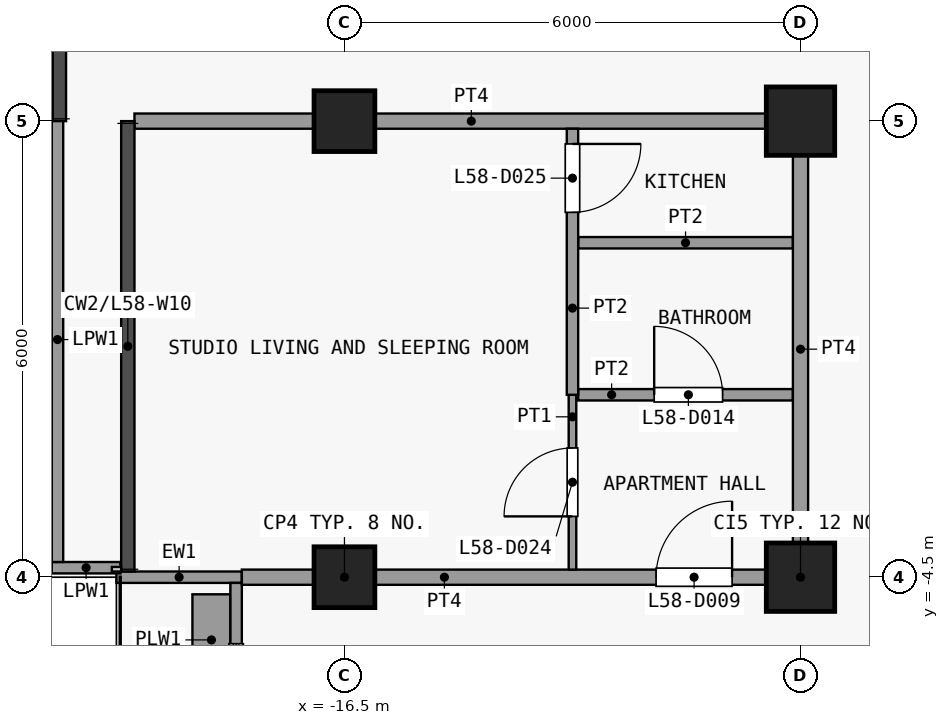
"""IFC4 building model, lengths in metres.
Left out: names, types, materials, properties, quantities, classifications, styles, units other than length and angle.
Written with IfcOpenShell. Run it as: python <this file> out.ifc"""

import sys

from ifc_helpers import new_model, si_unit, direction, frame, frame_2d, origin, origin_2d, place, context, subcontext, project, spatial, rectangle, extrude, element, fill, save


model = new_model("IFC4")
c1 = context("Model", 3, precision=1e-05, world=origin(), true_north=direction((0.0, 1.0)))
c2 = subcontext(c1, "Body", "Model", "MODEL_VIEW")
j1 = project(units=[si_unit("LENGTHUNIT", "METRE"), si_unit("PLANEANGLEUNIT", "RADIAN")], contexts=[c1])
p1 = place(None, origin())
s1 = spatial("IfcSite", under=j1, at=p1, CompositionType="ELEMENT")
p2 = place(p1, origin())
s2 = spatial("IfcBuilding", under=s1, at=p2, CompositionType="ELEMENT")
p3 = place(p2, frame((0.0, 0.0, 230.3)))
s3 = spatial("IfcBuildingStorey", under=s2, at=p3, CompositionType="ELEMENT", Elevation=230.3)
for number, where, z_axis, x_axis in (
    (1, (-16.5, -4.5, 0.0), (0.0, 0.0, 1.0), (1.0, 0.0, 0.0)),
    (2, (-16.5, 1.5, 0.0), (0.0, 0.0, 1.0), (1.0, 0.0, 0.0)),
):
    element("IfcColumn", number, at=place(p3, frame(where, z_axis=z_axis, x_axis=x_axis)), inside=s3, PredefinedType="COLUMN", context=c2, shape_type="SweptSolid", body=[
        extrude(rectangle(XDim=0.8, YDim=0.8, at=origin_2d()), origin(), (0.0, 0.0, 1.0), 3.6),
    ])
for number, where, z_axis, x_axis in (
    (3, (-10.5, -4.5, 0.0), (0.0, 0.0, 1.0), (1.0, 0.0, 0.0)),
    (4, (-10.5, 1.5, 0.0), (0.0, 0.0, 1.0), (1.0, 0.0, 0.0)),
):
    element("IfcColumn", number, at=place(p3, frame(where, z_axis=z_axis, x_axis=x_axis)), inside=s3, PredefinedType="COLUMN", context=c2, shape_type="SweptSolid", body=[
        extrude(rectangle(XDim=0.9, YDim=0.9, at=origin_2d()), origin(), (0.0, 0.0, 1.0), 3.6),
    ])
p4 = place(p3, frame((-17.85, -4.5, 0.0), z_axis=(0.0, 0.0, 1.0), x_axis=(-1.0, 0.0, 0.0)))
e5 = element("IfcWall", 5, at=p4, inside=s3, PredefinedType="SOLIDWALL", context=c2, shape_type="SweptSolid", body=[
    extrude(rectangle(XDim=1.65, YDim=0.15, at=frame_2d((0.825, 0.0))), origin(), (0.0, 0.0, 1.0), 3.3),
])
p5 = place(p3, frame((-17.925, -13.425, 0.0), z_axis=(0.0, 0.0, 1.0), x_axis=(0.0, 1.0, 0.0)))
e6 = element("IfcWall", 6, at=p5, inside=s3, PredefinedType="SOLIDWALL", context=c2, shape_type="SweptSolid", body=[
    extrude(rectangle(XDim=8.85, YDim=0.15, at=frame_2d((4.425, 0.0))), origin(), (0.0, 0.0, 1.0), 3.3),
])
p6 = place(p5, frame((3.05, 0.0, 0.0)))
e7 = element("IfcOpeningElement", 7, at=p6, cuts=e6, PredefinedType="OPENING", context=c2, shape_type="SweptSolid", body=[
    extrude(rectangle(XDim=1.2, YDim=2.4, at=frame_2d((0.6, 1.2))), frame((0.0, 0.085, 0.0), z_axis=(0.0, -1.0, 0.0), x_axis=(1.0, 0.0, 0.0)), (0.0, 0.0, 1.0), 0.17),
])
p7 = place(p5, frame((0.25, 0.0, 0.9)))
e8 = element("IfcOpeningElement", 8, at=p7, cuts=e6, PredefinedType="OPENING", context=c2, shape_type="SweptSolid", body=[
    extrude(rectangle(XDim=2.05, YDim=2.1, at=frame_2d((1.025, 1.05))), frame((0.0, 0.085, 0.0), z_axis=(0.0, -1.0, 0.0), x_axis=(1.0, 0.0, 0.0)), (0.0, 0.0, 1.0), 0.17),
])
p8 = place(p5, frame((5.775, 0.0, 0.9)))
e9 = element("IfcOpeningElement", 9, at=p8, cuts=e6, PredefinedType="OPENING", context=c2, shape_type="SweptSolid", body=[
    extrude(rectangle(XDim=2.275, YDim=2.1, at=frame_2d((1.137, 1.05))), frame((0.0, 0.085, 0.0), z_axis=(0.0, -1.0, 0.0), x_axis=(1.0, 0.0, 0.0)), (0.0, 0.0, 1.0), 0.17),
])
p9 = place(p3, frame((-18.25, -5.925, 0.0), z_axis=(0.0, 0.0, 1.0), x_axis=(0.0, 1.0, 0.0)))
e10 = element("IfcWall", 10, at=p9, inside=s3, PredefinedType="USERDEFINED", context=c2, shape_type="SweptSolid", body=[
    extrude(rectangle(XDim=1.2, YDim=0.5, at=frame_2d((0.6, 0.0))), origin(), (0.0, 0.0, 1.0), 0.9),
])
p10 = place(p3, frame((-19.448, -4.375, 0.0), z_axis=(0.0, 0.0, 1.0), x_axis=(-1.0, 0.0, 0.0)))
e11 = element("IfcWall", 11, at=p10, inside=s3, PredefinedType="PARAPET", context=c2, shape_type="SweptSolid", body=[
    extrude(rectangle(XDim=0.903, YDim=0.15, at=frame_2d((0.451, 0.0))), origin(), (0.0, 0.0, 1.0), 1.15),
])
p11 = place(p3, frame((-20.275, -4.3, 0.0), z_axis=(0.0, 0.0, 1.0), x_axis=(0.0, 1.0, 0.0)))
e12 = element("IfcWall", 12, at=p11, inside=s3, PredefinedType="PARAPET", context=c2, shape_type="SweptSolid", body=[
    extrude(rectangle(XDim=5.853, YDim=0.15, at=frame_2d((2.926, 0.0))), origin(), (0.0, 0.0, 1.0), 1.15),
])
p12 = place(p3, frame((-17.85, -4.5, 0.0), z_axis=(0.0, 0.0, 1.0), x_axis=(1.0, 0.0, 0.0)))
e13 = element("IfcWall", 13, at=p12, inside=s3, PredefinedType="PARTITIONING", context=c2, shape_type="SweptSolid", body=[
    extrude(rectangle(XDim=7.45, YDim=0.2, at=frame_2d((3.725, 0.0))), origin(), (0.0, 0.0, 1.0), 3.3),
])
p13 = place(p12, frame((5.45, 0.0, 0.0)))
e14 = element("IfcOpeningElement", 14, at=p13, cuts=e13, PredefinedType="OPENING", context=c2, shape_type="SweptSolid", body=[
    extrude(rectangle(XDim=1.0, YDim=2.1, at=frame_2d((0.5, 1.05))), frame((0.0, 0.11, 0.0), z_axis=(0.0, -1.0, 0.0), x_axis=(1.0, 0.0, 0.0)), (0.0, 0.0, 1.0), 0.22),
])
p14 = place(p3, frame((-13.425, -2.1, 0.0), z_axis=(0.0, 0.0, 1.0), x_axis=(1.0, 0.0, 0.0)))
e15 = element("IfcWall", 15, at=p14, inside=s3, PredefinedType="PARTITIONING", context=c2, shape_type="SweptSolid", body=[
    extrude(rectangle(XDim=2.825, YDim=0.15, at=frame_2d((1.413, 0.0))), origin(), (0.0, 0.0, 1.0), 3.3),
])
p15 = place(p14, frame((1.0, 0.0, 0.0)))
e16 = element("IfcOpeningElement", 16, at=p15, cuts=e15, PredefinedType="OPENING", context=c2, shape_type="SweptSolid", body=[
    extrude(rectangle(XDim=0.9, YDim=2.1, at=frame_2d((0.45, 1.05))), frame((0.0, 0.085, 0.0), z_axis=(0.0, -1.0, 0.0), x_axis=(1.0, 0.0, 0.0)), (0.0, 0.0, 1.0), 0.17),
])
p16 = place(p3, frame((-13.425, -0.1, 0.0), z_axis=(0.0, 0.0, 1.0), x_axis=(1.0, 0.0, 0.0)))
e17 = element("IfcWall", 17, at=p16, inside=s3, PredefinedType="PARTITIONING", context=c2, shape_type="SweptSolid", body=[
    extrude(rectangle(XDim=2.825, YDim=0.15, at=frame_2d((1.413, 0.0))), origin(), (0.0, 0.0, 1.0), 3.3),
])
p17 = place(p3, frame((-19.262, 1.5, 0.0), z_axis=(0.0, 0.0, 1.0), x_axis=(1.0, 0.0, 0.0)))
e18 = element("IfcWall", 18, at=p17, inside=s3, PredefinedType="PARTITIONING", context=c2, shape_type="SweptSolid", body=[
    extrude(rectangle(XDim=8.863, YDim=0.2, at=frame_2d((4.431, 0.0))), origin(), (0.0, 0.0, 1.0), 3.3),
])
p18 = place(p3, frame((-13.5, -4.4, 0.0), z_axis=(0.0, 0.0, 1.0), x_axis=(0.0, 1.0, 0.0)))
e19 = element("IfcWall", 19, at=p18, inside=s3, PredefinedType="PARTITIONING", context=c2, shape_type="SweptSolid", body=[
    extrude(rectangle(XDim=2.3, YDim=0.1, at=frame_2d((1.15, 0.0))), origin(), (0.0, 0.0, 1.0), 3.3),
])
p19 = place(p18, frame((0.7, 0.0, 0.0)))
e20 = element("IfcOpeningElement", 20, at=p19, cuts=e19, PredefinedType="OPENING", context=c2, shape_type="SweptSolid", body=[
    extrude(rectangle(XDim=0.9, YDim=2.1, at=frame_2d((0.45, 1.05))), frame((0.0, 0.06, 0.0), z_axis=(0.0, -1.0, 0.0), x_axis=(1.0, 0.0, 0.0)), (0.0, 0.0, 1.0), 0.12),
])
p20 = place(p3, frame((-13.5, -2.1, 0.0), z_axis=(0.0, 0.0, 1.0), x_axis=(0.0, 1.0, 0.0)))
e21 = element("IfcWall", 21, at=p20, inside=s3, PredefinedType="PARTITIONING", context=c2, shape_type="SweptSolid", body=[
    extrude(rectangle(XDim=3.5, YDim=0.15, at=frame_2d((1.75, 0.0))), origin(), (0.0, 0.0, 1.0), 3.3),
])
p21 = place(p20, frame((2.4, 0.0, 0.0)))
e22 = element("IfcOpeningElement", 22, at=p21, cuts=e21, PredefinedType="OPENING", context=c2, shape_type="SweptSolid", body=[
    extrude(rectangle(XDim=0.9, YDim=2.1, at=frame_2d((0.45, 1.05))), frame((0.0, 0.085, 0.0), z_axis=(0.0, -1.0, 0.0), x_axis=(1.0, 0.0, 0.0)), (0.0, 0.0, 1.0), 0.17),
])
p22 = place(p3, frame((-10.5, -4.4, 0.0), z_axis=(0.0, 0.0, 1.0), x_axis=(0.0, 1.0, 0.0)))
e23 = element("IfcWall", 23, at=p22, inside=s3, PredefinedType="PARTITIONING", context=c2, shape_type="SweptSolid", body=[
    extrude(rectangle(XDim=5.8, YDim=0.2, at=frame_2d((2.9, 0.0))), origin(), (0.0, 0.0, 1.0), 3.3),
])
p23 = place(p8, origin())
e24 = element("IfcWindow", 24, at=p23, inside=s3, PartitioningType="SINGLE_PANEL", PredefinedType="WINDOW", context=c2, shape_type="SweptSolid", body=[
    extrude(rectangle(XDim=2.275, YDim=2.1, at=frame_2d((1.137, 1.05))), frame((0.0, 0.03, 0.0), z_axis=(0.0, -1.0, 0.0), x_axis=(1.0, 0.0, 0.0)), (0.0, 0.0, 1.0), 0.06),
])
fill(e9, e24)
p24 = place(p13, origin())
e25 = element("IfcDoor", 25, at=p24, inside=s3, OperationType="SINGLE_SWING_LEFT", PredefinedType="DOOR", context=c2, shape_type="SweptSolid", body=[
    extrude(rectangle(XDim=1.0, YDim=2.1, at=frame_2d((0.5, 1.05))), frame((0.0, 0.025, 0.0), z_axis=(0.0, -1.0, 0.0), x_axis=(1.0, 0.0, 0.0)), (0.0, 0.0, 1.0), 0.05),
])
fill(e14, e25)
p25 = place(p15, origin())
e26 = element("IfcDoor", 26, at=p25, inside=s3, OperationType="SINGLE_SWING_RIGHT", PredefinedType="DOOR", context=c2, shape_type="SweptSolid", body=[
    extrude(rectangle(XDim=0.9, YDim=2.1, at=frame_2d((0.45, 1.05))), frame((0.0, 0.025, 0.0), z_axis=(0.0, -1.0, 0.0), x_axis=(1.0, 0.0, 0.0)), (0.0, 0.0, 1.0), 0.05),
])
fill(e16, e26)
p26 = place(p19, origin())
e27 = element("IfcDoor", 27, at=p26, inside=s3, OperationType="SINGLE_SWING_RIGHT", PredefinedType="DOOR", context=c2, shape_type="SweptSolid", body=[
    extrude(rectangle(XDim=0.9, YDim=2.1, at=frame_2d((0.45, 1.05))), frame((0.0, 0.025, 0.0), z_axis=(0.0, -1.0, 0.0), x_axis=(1.0, 0.0, 0.0)), (0.0, 0.0, 1.0), 0.05),
])
fill(e20, e27)
p27 = place(p21, origin())
e28 = element("IfcDoor", 28, at=p27, inside=s3, OperationType="SINGLE_SWING_RIGHT", PredefinedType="DOOR", context=c2, shape_type="SweptSolid", body=[
    extrude(rectangle(XDim=0.9, YDim=2.1, at=frame_2d((0.45, 1.05))), frame((0.0, 0.025, 0.0), z_axis=(0.0, -1.0, 0.0), x_axis=(1.0, 0.0, 0.0)), (0.0, 0.0, 1.0), 0.05),
])
fill(e22, e28)
save(model, sys.argv[1])
